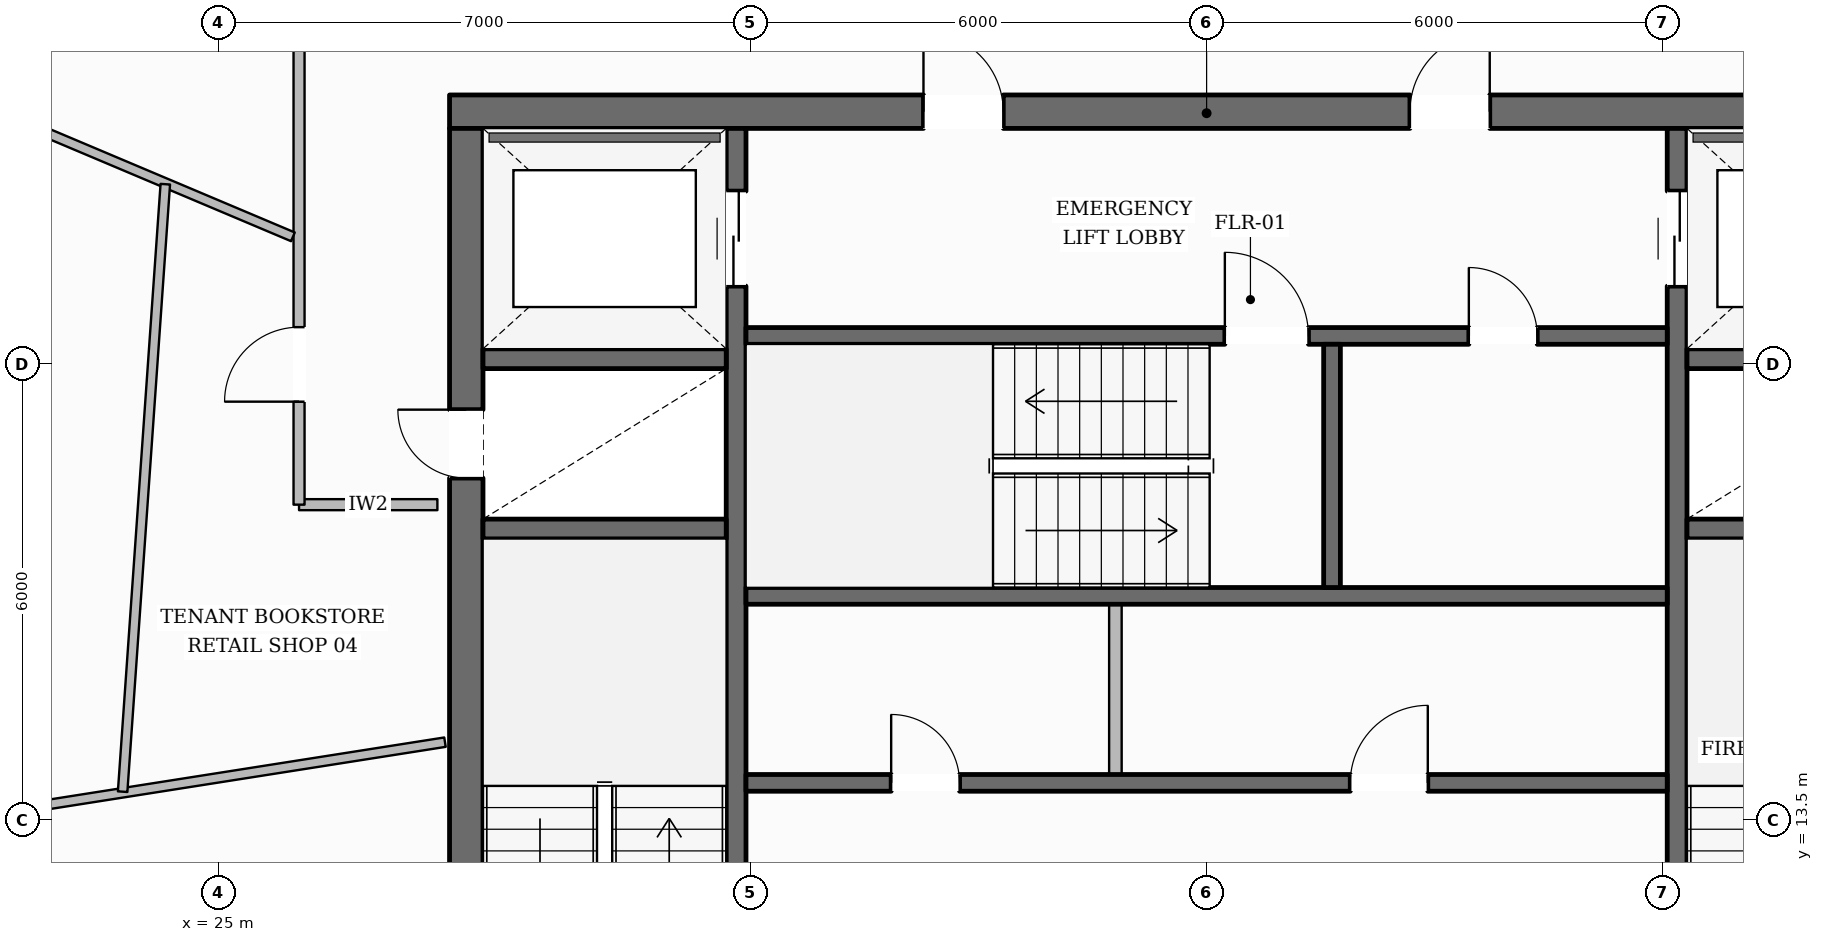
"""IFC4 building model, lengths in metres.
Left out: names, types, materials, properties, quantities, classifications, styles, units other than length and angle.
Written with IfcOpenShell. Run it as: python <this file> out.ifc"""

import sys

from ifc_helpers import new_model, si_unit, direction, frame, frame_2d, origin, place, context, subcontext, project, spatial, rectangle, extrude, element, fill, save


model = new_model("IFC4")
c1 = context("Model", 3, precision=1e-05, world=origin(), true_north=direction((0.0, 1.0)))
c2 = subcontext(c1, "Body", "Model", "MODEL_VIEW")
j1 = project(units=[si_unit("LENGTHUNIT", "METRE"), si_unit("PLANEANGLEUNIT", "RADIAN")], contexts=[c1])
p1 = place(None, origin())
s1 = spatial("IfcSite", under=j1, at=p1, CompositionType="ELEMENT")
p2 = place(p1, origin())
s2 = spatial("IfcBuilding", under=s1, at=p2, CompositionType="ELEMENT")
p3 = place(p2, frame((0.0, 0.0, 168.85)))
s3 = spatial("IfcBuildingStorey", under=s2, at=p3, CompositionType="ELEMENT", Elevation=168.85)
p4 = place(p3, frame((28.04, 22.82, 0.0), z_axis=(0.0, 0.0, 1.0), x_axis=(1.0, 0.0, 0.0)))
e1 = element("IfcWall", 1, at=p4, inside=s3, PredefinedType="SOLIDWALL", context=c2, shape_type="SweptSolid", body=[
    extrude(rectangle(XDim=19.92, YDim=0.44, at=frame_2d((9.96, 0.0))), origin(), (0.0, 0.0, 1.0), 3.6),
])
p5 = place(p4, frame((6.235, 0.0, 0.0)))
e2 = element("IfcOpeningElement", 2, at=p5, cuts=e1, PredefinedType="OPENING", context=c2, shape_type="SweptSolid", body=[
    extrude(rectangle(XDim=1.05, YDim=2.15, at=frame_2d((0.525, 1.075))), frame((0.0, 0.23, 0.0), z_axis=(0.0, -1.0, 0.0), x_axis=(1.0, 0.0, 0.0)), (0.0, 0.0, 1.0), 0.46),
])
p6 = place(p4, frame((12.635, 0.0, 0.0)))
e3 = element("IfcOpeningElement", 3, at=p6, cuts=e1, PredefinedType="OPENING", context=c2, shape_type="SweptSolid", body=[
    extrude(rectangle(XDim=1.05, YDim=2.15, at=frame_2d((0.525, 1.075))), frame((0.0, 0.23, 0.0), z_axis=(0.0, -1.0, 0.0), x_axis=(1.0, 0.0, 0.0)), (0.0, 0.0, 1.0), 0.46),
])
p7 = place(p3, frame((28.26, 9.6, 0.0), z_axis=(0.0, 0.0, 1.0), x_axis=(0.0, 1.0, 0.0)))
e4 = element("IfcWall", 4, at=p7, inside=s3, PredefinedType="SOLIDWALL", context=c2, shape_type="SweptSolid", body=[
    extrude(rectangle(XDim=13.0, YDim=0.44, at=frame_2d((6.5, 0.0))), origin(), (0.0, 0.0, 1.0), 3.6),
])
p8 = place(p7, frame((0.2, 0.0, 0.0)))
e5 = element("IfcOpeningElement", 5, at=p8, cuts=e4, PredefinedType="OPENING", context=c2, shape_type="SweptSolid", body=[
    extrude(rectangle(XDim=1.1, YDim=2.15, at=frame_2d((0.55, 1.075))), frame((0.0, 0.23, 0.0), z_axis=(0.0, -1.0, 0.0), x_axis=(1.0, 0.0, 0.0)), (0.0, 0.0, 1.0), 0.46),
])
p9 = place(p7, frame((8.4, 0.0, 0.0)))
e6 = element("IfcOpeningElement", 6, at=p9, cuts=e4, PredefinedType="OPENING", context=c2, shape_type="SweptSolid", body=[
    extrude(rectangle(XDim=0.9, YDim=2.1, at=frame_2d((0.45, 1.05))), frame((0.0, 0.23, 0.0), z_axis=(0.0, -1.0, 0.0), x_axis=(1.0, 0.0, 0.0)), (0.0, 0.0, 1.0), 0.46),
])
p10 = place(p3, frame((31.81, 9.6, 0.0), z_axis=(0.0, 0.0, 1.0), x_axis=(0.0, 1.0, 0.0)))
e7 = element("IfcWall", 7, at=p10, inside=s3, PredefinedType="SHEAR", context=c2, shape_type="SweptSolid", body=[
    extrude(rectangle(XDim=13.0, YDim=0.26, at=frame_2d((6.5, 0.0))), origin(), (0.0, 0.0, 1.0), 3.6),
])
p11 = place(p10, frame((10.925, 0.0, 0.0)))
e8 = element("IfcOpeningElement", 8, at=p11, cuts=e7, PredefinedType="OPENING", context=c2, shape_type="SweptSolid", body=[
    extrude(rectangle(XDim=1.25, YDim=2.25, at=frame_2d((0.625, 1.125))), frame((0.0, 0.14, 0.0), z_axis=(0.0, -1.0, 0.0), x_axis=(1.0, 0.0, 0.0)), (0.0, 0.0, 1.0), 0.28),
])
p12 = place(p3, frame((44.19, 9.6, 0.0), z_axis=(0.0, 0.0, 1.0), x_axis=(0.0, 1.0, 0.0)))
e9 = element("IfcWall", 9, at=p12, inside=s3, PredefinedType="SHEAR", context=c2, shape_type="SweptSolid", body=[
    extrude(rectangle(XDim=13.0, YDim=0.26, at=frame_2d((6.5, 0.0))), origin(), (0.0, 0.0, 1.0), 3.6),
])
p13 = place(p12, frame((10.925, 0.0, 0.0)))
e10 = element("IfcOpeningElement", 10, at=p13, cuts=e9, PredefinedType="OPENING", context=c2, shape_type="SweptSolid", body=[
    extrude(rectangle(XDim=1.25, YDim=2.25, at=frame_2d((0.625, 1.125))), frame((0.0, 0.14, 0.0), z_axis=(0.0, -1.0, 0.0), x_axis=(1.0, 0.0, 0.0)), (0.0, 0.0, 1.0), 0.28),
])
for number, where, z_axis, x_axis in (
    (11, (28.48, 17.33, 0.0), (0.0, 0.0, 1.0), (1.0, 0.0, 0.0)),
    (12, (28.48, 19.57, 0.0), (0.0, 0.0, 1.0), (1.0, 0.0, 0.0)),
    (13, (44.32, 17.33, 0.0), (0.0, 0.0, 1.0), (1.0, 0.0, 0.0)),
    (14, (44.32, 19.57, 0.0), (0.0, 0.0, 1.0), (1.0, 0.0, 0.0)),
):
    element("IfcWall", number, at=place(p3, frame(where, z_axis=z_axis, x_axis=x_axis)), inside=s3, PredefinedType="SHEAR", context=c2, shape_type="SweptSolid", body=[
        extrude(rectangle(XDim=3.2, YDim=0.26, at=frame_2d((1.6, 0.0))), origin(), (0.0, 0.0, 1.0), 3.6),
    ])
p14 = place(p3, frame((31.94, 19.87, 0.0), z_axis=(0.0, 0.0, 1.0), x_axis=(1.0, 0.0, 0.0)))
e15 = element("IfcWall", 15, at=p14, inside=s3, PredefinedType="SOLIDWALL", context=c2, shape_type="SweptSolid", body=[
    extrude(rectangle(XDim=12.12, YDim=0.22, at=frame_2d((6.06, 0.0))), origin(), (0.0, 0.0, 1.0), 3.6),
])
p15 = place(p14, frame((6.3, 0.0, 0.0)))
e16 = element("IfcOpeningElement", 16, at=p15, cuts=e15, PredefinedType="OPENING", context=c2, shape_type="SweptSolid", body=[
    extrude(rectangle(XDim=1.1, YDim=2.15, at=frame_2d((0.55, 1.075))), frame((0.0, 0.12, 0.0), z_axis=(0.0, -1.0, 0.0), x_axis=(1.0, 0.0, 0.0)), (0.0, 0.0, 1.0), 0.24),
])
p16 = place(p14, frame((9.51, 0.0, 0.0)))
e17 = element("IfcOpeningElement", 17, at=p16, cuts=e15, PredefinedType="OPENING", context=c2, shape_type="SweptSolid", body=[
    extrude(rectangle(XDim=0.9, YDim=2.1, at=frame_2d((0.45, 1.05))), frame((0.0, 0.12, 0.0), z_axis=(0.0, -1.0, 0.0), x_axis=(1.0, 0.0, 0.0)), (0.0, 0.0, 1.0), 0.24),
])
p17 = place(p3, frame((31.94, 16.45, 0.0), z_axis=(0.0, 0.0, 1.0), x_axis=(1.0, 0.0, 0.0)))
e18 = element("IfcWall", 18, at=p17, inside=s3, PredefinedType="SOLIDWALL", context=c2, shape_type="SweptSolid", body=[
    extrude(rectangle(XDim=12.12, YDim=0.22, at=frame_2d((6.06, 0.0))), origin(), (0.0, 0.0, 1.0), 3.6),
])
p18 = place(p3, frame((39.65, 16.56, 0.0), z_axis=(0.0, 0.0, 1.0), x_axis=(0.0, 1.0, 0.0)))
e19 = element("IfcWall", 19, at=p18, inside=s3, PredefinedType="SOLIDWALL", context=c2, shape_type="SweptSolid", body=[
    extrude(rectangle(XDim=3.2, YDim=0.22, at=frame_2d((1.6, 0.0))), origin(), (0.0, 0.0, 1.0), 3.6),
])
p19 = place(p3, frame((31.94, 13.99, 0.0), z_axis=(0.0, 0.0, 1.0), x_axis=(1.0, 0.0, 0.0)))
e20 = element("IfcWall", 20, at=p19, inside=s3, PredefinedType="SOLIDWALL", context=c2, shape_type="SweptSolid", body=[
    extrude(rectangle(XDim=12.12, YDim=0.22, at=frame_2d((6.06, 0.0))), origin(), (0.0, 0.0, 1.0), 3.6),
])
p20 = place(p19, frame((1.91, 0.0, 0.0)))
e21 = element("IfcOpeningElement", 21, at=p20, cuts=e20, PredefinedType="OPENING", context=c2, shape_type="SweptSolid", body=[
    extrude(rectangle(XDim=0.9, YDim=2.1, at=frame_2d((0.45, 1.05))), frame((0.0, 0.12, 0.0), z_axis=(0.0, -1.0, 0.0), x_axis=(1.0, 0.0, 0.0)), (0.0, 0.0, 1.0), 0.24),
])
p21 = place(p19, frame((7.95, 0.0, 0.0)))
e22 = element("IfcOpeningElement", 22, at=p21, cuts=e20, PredefinedType="OPENING", context=c2, shape_type="SweptSolid", body=[
    extrude(rectangle(XDim=1.02, YDim=2.15, at=frame_2d((0.51, 1.075))), frame((0.0, 0.12, 0.0), z_axis=(0.0, -1.0, 0.0), x_axis=(1.0, 0.0, 0.0)), (0.0, 0.0, 1.0), 0.24),
])
p22 = place(p3, frame((15.072, 12.292, 0.0), z_axis=(0.0, 0.0, 1.0), x_axis=(0.492336574501, 0.870404904288, 0.0)))
e23 = element("IfcWall", 23, at=p22, inside=s3, PredefinedType="STANDARD", context=c2, shape_type="SweptSolid", body=[
    extrude(rectangle(XDim=37.15, YDim=0.35, at=frame_2d((18.575, 0.0))), origin(), (0.0, 0.0, 1.0), 3.132),
])
p23 = place(p22, frame((8.888, 0.0, 0.0)))
e24 = element("IfcOpeningElement", 24, at=p23, cuts=e23, PredefinedType="OPENING", context=c2, shape_type="SweptSolid", body=[
    extrude(rectangle(XDim=1.0, YDim=2.2, at=frame_2d((0.5, 1.1))), frame((0.0, 0.185, 0.0), z_axis=(0.0, -1.0, 0.0), x_axis=(1.0, 0.0, 0.0)), (0.0, 0.0, 1.0), 0.37),
])
p24 = place(p22, frame((32.928, 0.0, 0.65)))
e25 = element("IfcOpeningElement", 25, at=p24, cuts=e23, PredefinedType="OPENING", context=c2, shape_type="SweptSolid", body=[
    extrude(rectangle(XDim=1.45, YDim=1.75, at=frame_2d((0.725, 0.875))), frame((0.0, 0.185, 0.0), z_axis=(0.0, -1.0, 0.0), x_axis=(1.0, 0.0, 0.0)), (0.0, 0.0, 1.0), 0.37),
])
p25 = place(p22, frame((26.895, 0.0, 0.65)))
e26 = element("IfcOpeningElement", 26, at=p25, cuts=e23, PredefinedType="OPENING", context=c2, shape_type="SweptSolid", body=[
    extrude(rectangle(XDim=1.45, YDim=1.75, at=frame_2d((0.725, 0.875))), frame((0.0, 0.185, 0.0), z_axis=(0.0, -1.0, 0.0), x_axis=(1.0, 0.0, 0.0)), (0.0, 0.0, 1.0), 0.37),
])
p26 = place(p22, frame((20.862, 0.0, 0.65)))
e27 = element("IfcOpeningElement", 27, at=p26, cuts=e23, PredefinedType="OPENING", context=c2, shape_type="SweptSolid", body=[
    extrude(rectangle(XDim=1.45, YDim=1.75, at=frame_2d((0.725, 0.875))), frame((0.0, 0.185, 0.0), z_axis=(0.0, -1.0, 0.0), x_axis=(1.0, 0.0, 0.0)), (0.0, 0.0, 1.0), 0.37),
])
p27 = place(p22, frame((2.764, 0.0, 0.65)))
e28 = element("IfcOpeningElement", 28, at=p27, cuts=e23, PredefinedType="OPENING", context=c2, shape_type="SweptSolid", body=[
    extrude(rectangle(XDim=1.45, YDim=1.75, at=frame_2d((0.725, 0.875))), frame((0.0, 0.185, 0.0), z_axis=(0.0, -1.0, 0.0), x_axis=(1.0, 0.0, 0.0)), (0.0, 0.0, 1.0), 0.37),
])
p28 = place(p3, frame((42.696, 44.593, 0.0), z_axis=(0.0, 0.0, 1.0), x_axis=(0.495321099056, -0.868709968188, 0.0)))
e29 = element("IfcWall", 29, at=p28, inside=s3, PredefinedType="STANDARD", context=c2, shape_type="SweptSolid", body=[
    extrude(rectangle(XDim=37.366, YDim=0.35, at=frame_2d((18.683, 0.0))), origin(), (0.0, 0.0, 1.0), 3.132),
])
p29 = place(p28, frame((33.134, 0.0, 0.65)))
e30 = element("IfcOpeningElement", 30, at=p29, cuts=e29, PredefinedType="OPENING", context=c2, shape_type="SweptSolid", body=[
    extrude(rectangle(XDim=1.45, YDim=1.75, at=frame_2d((0.725, 0.875))), frame((0.0, 0.185, 0.0), z_axis=(0.0, -1.0, 0.0), x_axis=(1.0, 0.0, 0.0)), (0.0, 0.0, 1.0), 0.37),
])
p30 = place(p28, frame((27.065, 0.0, 0.65)))
e31 = element("IfcOpeningElement", 31, at=p30, cuts=e29, PredefinedType="OPENING", context=c2, shape_type="SweptSolid", body=[
    extrude(rectangle(XDim=1.45, YDim=1.75, at=frame_2d((0.725, 0.875))), frame((0.0, 0.185, 0.0), z_axis=(0.0, -1.0, 0.0), x_axis=(1.0, 0.0, 0.0)), (0.0, 0.0, 1.0), 0.37),
])
p31 = place(p28, frame((20.995, 0.0, 0.65)))
e32 = element("IfcOpeningElement", 32, at=p31, cuts=e29, PredefinedType="OPENING", context=c2, shape_type="SweptSolid", body=[
    extrude(rectangle(XDim=1.45, YDim=1.75, at=frame_2d((0.725, 0.875))), frame((0.0, 0.185, 0.0), z_axis=(0.0, -1.0, 0.0), x_axis=(1.0, 0.0, 0.0)), (0.0, 0.0, 1.0), 0.37),
])
p32 = place(p28, frame((8.857, 0.0, 0.65)))
e33 = element("IfcOpeningElement", 33, at=p32, cuts=e29, PredefinedType="OPENING", context=c2, shape_type="SweptSolid", body=[
    extrude(rectangle(XDim=1.45, YDim=1.75, at=frame_2d((0.725, 0.875))), frame((0.0, 0.185, 0.0), z_axis=(0.0, -1.0, 0.0), x_axis=(1.0, 0.0, 0.0)), (0.0, 0.0, 1.0), 0.37),
])
p33 = place(p28, frame((2.787, 0.0, 0.65)))
e34 = element("IfcOpeningElement", 34, at=p33, cuts=e29, PredefinedType="OPENING", context=c2, shape_type="SweptSolid", body=[
    extrude(rectangle(XDim=1.45, YDim=1.75, at=frame_2d((0.725, 0.875))), frame((0.0, 0.185, 0.0), z_axis=(0.0, -1.0, 0.0), x_axis=(1.0, 0.0, 0.0)), (0.0, 0.0, 1.0), 0.37),
])
p34 = place(p3, frame((36.8, 14.1, 0.0), z_axis=(0.0, 0.0, 1.0), x_axis=(0.0, 1.0, 0.0)))
e35 = element("IfcWall", 35, at=p34, inside=s3, PredefinedType="PARTITIONING", context=c2, shape_type="SweptSolid", body=[
    extrude(rectangle(XDim=2.24, YDim=0.165, at=frame_2d((1.12, 0.0))), origin(), (0.0, 0.0, 1.0), 3.6),
])
p35 = place(p3, frame((27.88, 17.65, 0.0), z_axis=(0.0, 0.0, 1.0), x_axis=(-1.0, 0.0, 0.0)))
e36 = element("IfcWall", 36, at=p35, inside=s3, PredefinedType="PARTITIONING", context=c2, shape_type="SweptSolid", body=[
    extrude(rectangle(XDim=1.82, YDim=0.145, at=frame_2d((0.91, 0.0))), origin(), (0.0, 0.0, 1.0), 3.141),
])
p36 = place(p3, frame((26.06, 17.65, 0.0), z_axis=(0.0, 0.0, 1.0), x_axis=(0.0, 1.0, 0.0)))
e37 = element("IfcWall", 37, at=p36, inside=s3, PredefinedType="PARTITIONING", context=c2, shape_type="SweptSolid", body=[
    extrude(rectangle(XDim=7.37, YDim=0.145, at=frame_2d((3.685, 0.0))), origin(), (0.0, 0.0, 1.0), 3.339),
])
p37 = place(p36, frame((1.355, 0.0, 0.0)))
e38 = element("IfcOpeningElement", 38, at=p37, cuts=e37, PredefinedType="OPENING", context=c2, shape_type="SweptSolid", body=[
    extrude(rectangle(XDim=0.98, YDim=2.15, at=frame_2d((0.49, 1.075))), frame((0.0, 0.083, 0.0), z_axis=(0.0, -1.0, 0.0), x_axis=(1.0, 0.0, 0.0)), (0.0, 0.0, 1.0), 0.165),
])
p38 = place(p3, frame((25.979, 21.174, 0.0), z_axis=(0.0, 0.0, 1.0), x_axis=(-0.921289917918, 0.388876442001, 0.0)))
e39 = element("IfcWall", 39, at=p38, inside=s3, PredefinedType="PARTITIONING", context=c2, shape_type="SweptSolid", body=[
    extrude(rectangle(XDim=4.528, YDim=0.125, at=frame_2d((2.264, 0.0))), origin(), (0.0, 0.0, 1.0), 3.6),
])
p39 = place(p3, frame((27.98, 14.525, 0.0), z_axis=(0.0, 0.0, 1.0), x_axis=(-0.987880348001, -0.155217325174, 0.0)))
e40 = element("IfcWall", 40, at=p39, inside=s3, PredefinedType="PARTITIONING", context=c2, shape_type="SweptSolid", body=[
    extrude(rectangle(XDim=12.281, YDim=0.125, at=frame_2d((6.141, 0.0))), origin(), (0.0, 0.0, 1.0), 3.141),
])
p40 = place(p39, frame((7.763, 0.0, 0.0)))
e41 = element("IfcOpeningElement", 41, at=p40, cuts=e40, PredefinedType="OPENING", context=c2, shape_type="SweptSolid", body=[
    extrude(rectangle(XDim=0.98, YDim=2.15, at=frame_2d((0.49, 1.075))), frame((0.0, 0.073, 0.0), z_axis=(0.0, -1.0, 0.0), x_axis=(1.0, 0.0, 0.0)), (0.0, 0.0, 1.0), 0.145),
])
p41 = place(p3, frame((24.3, 21.866, 0.0), z_axis=(0.0, 0.0, 1.0), x_axis=(-0.070058077284, -0.997542914268, 0.0)))
e42 = element("IfcWall", 42, at=p41, inside=s3, PredefinedType="PARTITIONING", context=c2, shape_type="SweptSolid", body=[
    extrude(rectangle(XDim=8.012, YDim=0.125, at=frame_2d((4.006, 0.0))), origin(), (0.0, 0.0, 1.0), 3.339),
])
p42 = place(p15, origin())
e43 = element("IfcDoor", 43, at=p42, inside=s3, OperationType="SINGLE_SWING_LEFT", PredefinedType="DOOR", context=c2, shape_type="SweptSolid", body=[
    extrude(rectangle(XDim=1.1, YDim=2.15, at=frame_2d((0.55, 1.075))), frame((0.0, 0.025, 0.0), z_axis=(0.0, -1.0, 0.0), x_axis=(1.0, 0.0, 0.0)), (0.0, 0.0, 1.0), 0.05),
])
fill(e16, e43)
p43 = place(p9, origin())
e44 = element("IfcDoor", 44, at=p43, inside=s3, OperationType="SINGLE_SWING_RIGHT", PredefinedType="DOOR", context=c2, shape_type="SweptSolid", body=[
    extrude(rectangle(XDim=0.9, YDim=2.1, at=frame_2d((0.45, 1.05))), frame((0.0, 0.025, 0.0), z_axis=(0.0, -1.0, 0.0), x_axis=(1.0, 0.0, 0.0)), (0.0, 0.0, 1.0), 0.05),
])
fill(e6, e44)
p44 = place(p5, origin())
e45 = element("IfcDoor", 45, at=p44, inside=s3, OperationType="SINGLE_SWING_LEFT", PredefinedType="DOOR", context=c2, shape_type="SweptSolid", body=[
    extrude(rectangle(XDim=1.05, YDim=2.15, at=frame_2d((0.525, 1.075))), frame((0.0, 0.025, 0.0), z_axis=(0.0, -1.0, 0.0), x_axis=(1.0, 0.0, 0.0)), (0.0, 0.0, 1.0), 0.05),
])
fill(e2, e45)
p45 = place(p6, origin())
e46 = element("IfcDoor", 46, at=p45, inside=s3, OperationType="SINGLE_SWING_RIGHT", PredefinedType="DOOR", context=c2, shape_type="SweptSolid", body=[
    extrude(rectangle(XDim=1.05, YDim=2.15, at=frame_2d((0.525, 1.075))), frame((0.0, 0.025, 0.0), z_axis=(0.0, -1.0, 0.0), x_axis=(1.0, 0.0, 0.0)), (0.0, 0.0, 1.0), 0.05),
])
fill(e3, e46)
p46 = place(p11, origin())
e47 = element("IfcDoor", 47, at=p46, inside=s3, OperationType="DOUBLE_DOOR_SLIDING", PredefinedType="DOOR", context=c2, shape_type="SweptSolid", body=[
    extrude(rectangle(XDim=1.25, YDim=2.25, at=frame_2d((0.625, 1.125))), frame((0.0, 0.025, 0.0), z_axis=(0.0, -1.0, 0.0), x_axis=(1.0, 0.0, 0.0)), (0.0, 0.0, 1.0), 0.05),
])
fill(e8, e47)
p47 = place(p13, origin())
e48 = element("IfcDoor", 48, at=p47, inside=s3, OperationType="DOUBLE_DOOR_SLIDING", PredefinedType="DOOR", context=c2, shape_type="SweptSolid", body=[
    extrude(rectangle(XDim=1.25, YDim=2.25, at=frame_2d((0.625, 1.125))), frame((0.0, 0.025, 0.0), z_axis=(0.0, -1.0, 0.0), x_axis=(1.0, 0.0, 0.0)), (0.0, 0.0, 1.0), 0.05),
])
fill(e10, e48)
p48 = place(p20, origin())
e49 = element("IfcDoor", 49, at=p48, inside=s3, OperationType="SINGLE_SWING_LEFT", PredefinedType="DOOR", context=c2, shape_type="SweptSolid", body=[
    extrude(rectangle(XDim=0.9, YDim=2.1, at=frame_2d((0.45, 1.05))), frame((0.0, 0.025, 0.0), z_axis=(0.0, -1.0, 0.0), x_axis=(1.0, 0.0, 0.0)), (0.0, 0.0, 1.0), 0.05),
])
fill(e21, e49)
p49 = place(p21, origin())
e50 = element("IfcDoor", 50, at=p49, inside=s3, OperationType="SINGLE_SWING_RIGHT", PredefinedType="DOOR", context=c2, shape_type="SweptSolid", body=[
    extrude(rectangle(XDim=1.02, YDim=2.15, at=frame_2d((0.51, 1.075))), frame((0.0, 0.025, 0.0), z_axis=(0.0, -1.0, 0.0), x_axis=(1.0, 0.0, 0.0)), (0.0, 0.0, 1.0), 0.05),
])
fill(e22, e50)
p50 = place(p16, origin())
e51 = element("IfcDoor", 51, at=p50, inside=s3, OperationType="SINGLE_SWING_LEFT", PredefinedType="DOOR", context=c2, shape_type="SweptSolid", body=[
    extrude(rectangle(XDim=0.9, YDim=2.1, at=frame_2d((0.45, 1.05))), frame((0.0, 0.025, 0.0), z_axis=(0.0, -1.0, 0.0), x_axis=(1.0, 0.0, 0.0)), (0.0, 0.0, 1.0), 0.05),
])
fill(e17, e51)
p51 = place(p37, origin())
e52 = element("IfcDoor", 52, at=p51, inside=s3, OperationType="SINGLE_SWING_LEFT", PredefinedType="DOOR", context=c2, shape_type="SweptSolid", body=[
    extrude(rectangle(XDim=0.98, YDim=2.15, at=frame_2d((0.49, 1.075))), frame((0.0, 0.025, 0.0), z_axis=(0.0, -1.0, 0.0), x_axis=(1.0, 0.0, 0.0)), (0.0, 0.0, 1.0), 0.05),
])
fill(e38, e52)
save(model, sys.argv[1])
